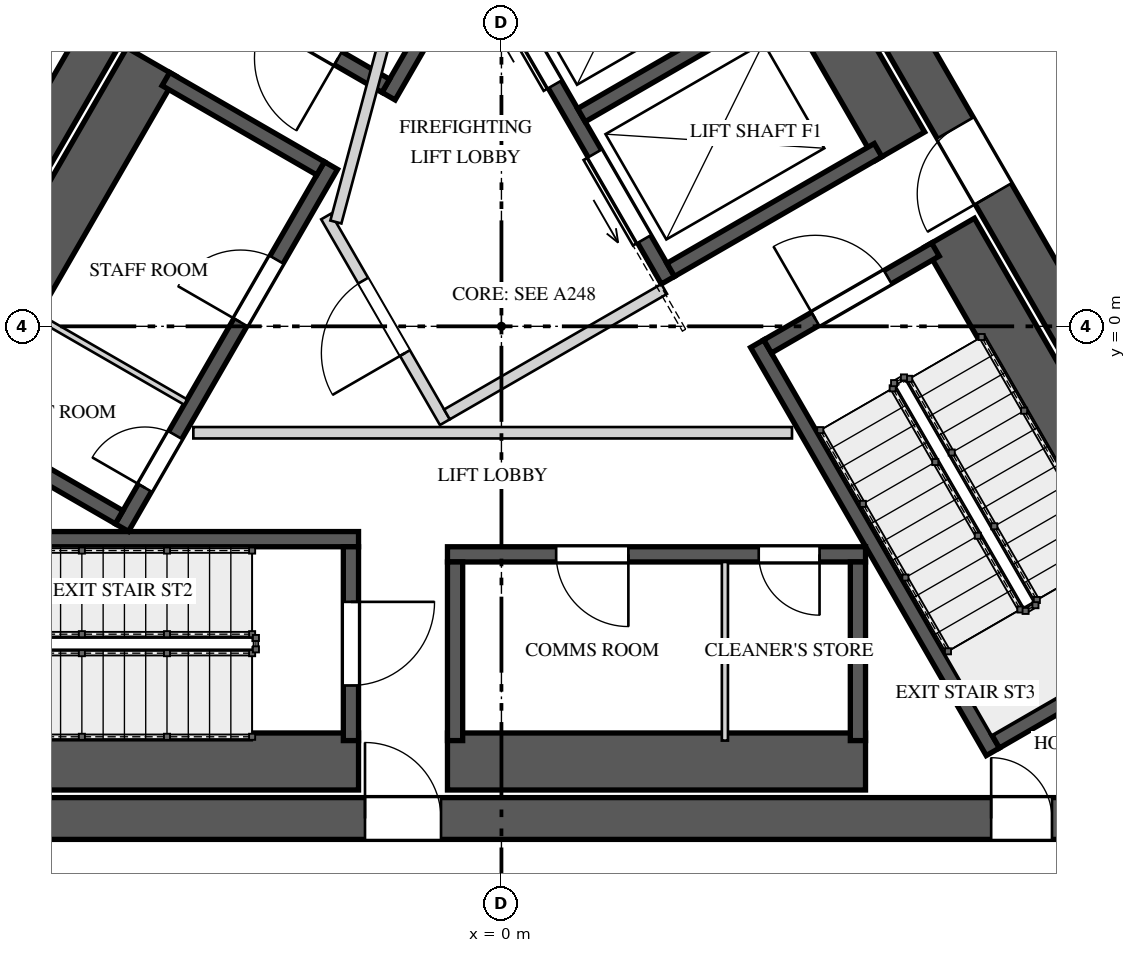
"""IFC4 building model, lengths in metres.
Left out: names, types, materials, properties, quantities, classifications, styles, units other than length and angle.
Written with IfcOpenShell. Run it as: python <this file> out.ifc"""

import sys

from ifc_helpers import new_model, si_unit, direction, frame, frame_2d, origin, place, context, subcontext, project, spatial, rectangle, extrude, element, fill, save


model = new_model("IFC4")
c1 = context("Model", 3, precision=1e-05, world=origin(), true_north=direction((0.0, 1.0)))
c2 = subcontext(c1, "Body", "Model", "MODEL_VIEW")
j1 = project(units=[si_unit("LENGTHUNIT", "METRE"), si_unit("PLANEANGLEUNIT", "RADIAN")], contexts=[c1])
p1 = place(None, origin())
s1 = spatial("IfcSite", under=j1, at=p1, CompositionType="ELEMENT")
p2 = place(p1, origin())
s2 = spatial("IfcBuilding", under=s1, at=p2, CompositionType="ELEMENT")
p3 = place(p2, frame((0.0, 0.0, 365.9)))
s3 = spatial("IfcBuildingStorey", under=s2, at=p3, CompositionType="ELEMENT", Elevation=365.9)
p4 = place(p3, frame((-1.285, 10.725, 0.0), z_axis=(0.0, 0.0, 1.0), x_axis=(-0.499994590896, -0.86602852671, 0.0)))
e1 = element("IfcWall", 1, at=p4, inside=s3, PredefinedType="SHEAR", context=c2, shape_type="SweptSolid", body=[
    extrude(rectangle(XDim=17.292, YDim=0.55, at=frame_2d((8.646, 0.0))), origin(), (0.0, 0.0, 1.0), 4.5),
])
p5 = place(p4, frame((6.851, 0.0, 0.0)))
e2 = element("IfcOpeningElement", 2, at=p5, cuts=e1, PredefinedType="OPENING", context=c2, shape_type="SweptSolid", body=[
    extrude(rectangle(XDim=1.0, YDim=2.4, at=frame_2d((0.5, 1.2))), frame((0.0, 0.285, 0.0), z_axis=(0.0, -1.0, 0.0), x_axis=(1.0, 0.0, 0.0)), (0.0, 0.0, 1.0), 0.57),
])
p6 = place(p3, frame((-8.646, -6.475, 0.0), z_axis=(0.0, 0.0, 1.0), x_axis=(1.0, 0.0, 0.0)))
e3 = element("IfcWall", 3, at=p6, inside=s3, PredefinedType="SHEAR", context=c2, shape_type="SweptSolid", body=[
    extrude(rectangle(XDim=17.292, YDim=0.55, at=frame_2d((8.646, 0.0))), origin(), (0.0, 0.0, 1.0), 4.5),
])
p7 = place(p6, frame((6.851, 0.0, 0.0)))
e4 = element("IfcOpeningElement", 4, at=p7, cuts=e3, PredefinedType="OPENING", context=c2, shape_type="SweptSolid", body=[
    extrude(rectangle(XDim=1.0, YDim=2.4, at=frame_2d((0.5, 1.2))), frame((0.0, 0.285, 0.0), z_axis=(0.0, -1.0, 0.0), x_axis=(1.0, 0.0, 0.0)), (0.0, 0.0, 1.0), 0.57),
])
p8 = place(p6, frame((15.089, 0.0, 0.0)))
e5 = element("IfcOpeningElement", 5, at=p8, cuts=e3, PredefinedType="OPENING", context=c2, shape_type="SweptSolid", body=[
    extrude(rectangle(XDim=0.8, YDim=2.1, at=frame_2d((0.4, 1.05))), frame((0.0, 0.285, 0.0), z_axis=(0.0, -1.0, 0.0), x_axis=(1.0, 0.0, 0.0)), (0.0, 0.0, 1.0), 0.57),
])
p9 = place(p3, frame((9.93, -4.25, 0.0), z_axis=(0.0, 0.0, 1.0), x_axis=(-0.499994590896, 0.86602852671, 0.0)))
e6 = element("IfcWall", 6, at=p9, inside=s3, PredefinedType="SHEAR", context=c2, shape_type="SweptSolid", body=[
    extrude(rectangle(XDim=17.292, YDim=0.55, at=frame_2d((8.646, 0.0))), origin(), (0.0, 0.0, 1.0), 4.5),
])
p10 = place(p9, frame((6.921, 0.0, 0.0)))
e7 = element("IfcOpeningElement", 7, at=p10, cuts=e6, PredefinedType="OPENING", context=c2, shape_type="SweptSolid", body=[
    extrude(rectangle(XDim=1.0, YDim=2.4, at=frame_2d((0.5, 1.2))), frame((0.0, 0.285, 0.0), z_axis=(0.0, -1.0, 0.0), x_axis=(1.0, 0.0, 0.0)), (0.0, 0.0, 1.0), 0.57),
])
p11 = place(p9, frame((14.626, 0.0, 0.0)))
e8 = element("IfcOpeningElement", 8, at=p11, cuts=e6, PredefinedType="OPENING", context=c2, shape_type="SweptSolid", body=[
    extrude(rectangle(XDim=0.8, YDim=2.1, at=frame_2d((0.4, 1.05))), frame((0.0, 0.285, 0.0), z_axis=(0.0, -1.0, 0.0), x_axis=(1.0, 0.0, 0.0)), (0.0, 0.0, 1.0), 0.57),
])
p12 = place(p3, frame((1.615, 8.397, 0.0), z_axis=(0.0, 0.0, 1.0), x_axis=(-0.500009909098, -0.866019682689, 0.0)))
e9 = element("IfcWall", 9, at=p12, inside=s3, PredefinedType="SOLIDWALL", context=c2, shape_type="SweptSolid", body=[
    extrude(rectangle(XDim=6.2, YDim=0.2, at=frame_2d((3.1, 0.0))), origin(), (0.0, 0.0, 1.0), 4.15),
])
p13 = place(p3, frame((-1.521, 3.165, 0.0), z_axis=(0.0, 0.0, 1.0), x_axis=(-0.866030925526, 0.499990435942, 0.0)))
e10 = element("IfcWall", 10, at=p13, inside=s3, PredefinedType="SOLIDWALL", context=c2, shape_type="SweptSolid", body=[
    extrude(rectangle(XDim=2.55, YDim=0.2, at=frame_2d((1.275, 0.0))), origin(), (0.0, 0.0, 1.0), 4.15),
])
p14 = place(p13, frame((0.725, 0.0, 0.0)))
e11 = element("IfcOpeningElement", 11, at=p14, cuts=e10, PredefinedType="OPENING", context=c2, shape_type="SweptSolid", body=[
    extrude(rectangle(XDim=1.1, YDim=2.4, at=frame_2d((0.55, 1.2))), frame((0.0, 0.11, 0.0), z_axis=(0.0, -1.0, 0.0), x_axis=(1.0, 0.0, 0.0)), (0.0, 0.0, 1.0), 0.22),
])
p15 = place(p3, frame((-8.08, -5.725, 0.0), z_axis=(0.0, 0.0, 1.0), x_axis=(1.0, 0.0, 0.0)))
e12 = element("IfcWall", 12, at=p15, inside=s3, PredefinedType="SOLIDWALL", context=c2, shape_type="SweptSolid", body=[
    extrude(rectangle(XDim=6.2, YDim=0.75, at=frame_2d((3.1, 0.0))), origin(), (0.0, 0.0, 1.0), 4.15),
])
p16 = place(p3, frame((-8.08, -2.8, 0.0), z_axis=(0.0, 0.0, 1.0), x_axis=(1.0, 0.0, 0.0)))
e13 = element("IfcWall", 13, at=p16, inside=s3, PredefinedType="SOLIDWALL", context=c2, shape_type="SweptSolid", body=[
    extrude(rectangle(XDim=6.2, YDim=0.2, at=frame_2d((3.1, 0.0))), origin(), (0.0, 0.0, 1.0), 4.15),
])
p17 = place(p3, frame((-1.98, -2.9, 0.0), z_axis=(0.0, 0.0, 1.0), x_axis=(0.0, -1.0, 0.0)))
e14 = element("IfcWall", 14, at=p17, inside=s3, PredefinedType="SOLIDWALL", context=c2, shape_type="SweptSolid", body=[
    extrude(rectangle(XDim=2.55, YDim=0.2, at=frame_2d((1.275, 0.0))), origin(), (0.0, 0.0, 1.0), 4.15),
])
p18 = place(p17, frame((0.725, 0.0, 0.0)))
e15 = element("IfcOpeningElement", 15, at=p18, cuts=e14, PredefinedType="OPENING", context=c2, shape_type="SweptSolid", body=[
    extrude(rectangle(XDim=1.1, YDim=2.4, at=frame_2d((0.55, 1.2))), frame((0.0, 0.11, 0.0), z_axis=(0.0, -1.0, 0.0), x_axis=(1.0, 0.0, 0.0)), (0.0, 0.0, 1.0), 0.22),
])
p19 = place(p3, frame((8.998, -4.135, 0.0), z_axis=(0.0, 0.0, 1.0), x_axis=(-0.500009909098, 0.866019682689, 0.0)))
e16 = element("IfcWall", 16, at=p19, inside=s3, PredefinedType="SOLIDWALL", context=c2, shape_type="SweptSolid", body=[
    extrude(rectangle(XDim=6.2, YDim=0.75, at=frame_2d((3.1, 0.0))), origin(), (0.0, 0.0, 1.0), 4.15),
])
p20 = place(p3, frame((6.465, -5.597, 0.0), z_axis=(0.0, 0.0, 1.0), x_axis=(-0.49998037582, 0.866036733513, 0.0)))
e17 = element("IfcWall", 17, at=p20, inside=s3, PredefinedType="SOLIDWALL", context=c2, shape_type="SweptSolid", body=[
    extrude(rectangle(XDim=6.2, YDim=0.2, at=frame_2d((3.1, 0.0))), origin(), (0.0, 0.0, 1.0), 4.15),
])
p21 = place(p3, frame((6.501, -5.461, 0.0), z_axis=(0.0, 0.0, 1.0), x_axis=(0.865989465428, 0.500062241894, 0.0)))
e18 = element("IfcWall", 18, at=p21, inside=s3, PredefinedType="SOLIDWALL", context=c2, shape_type="SweptSolid", body=[
    extrude(rectangle(XDim=2.55, YDim=0.2, at=frame_2d((1.275, 0.0))), origin(), (0.0, 0.0, 1.0), 4.15),
])
p22 = place(p3, frame((3.501, -0.265, 0.0), z_axis=(0.0, 0.0, 1.0), x_axis=(0.866030925526, 0.499990435942, 0.0)))
e19 = element("IfcWall", 19, at=p22, inside=s3, PredefinedType="SOLIDWALL", context=c2, shape_type="SweptSolid", body=[
    extrude(rectangle(XDim=2.55, YDim=0.2, at=frame_2d((1.275, 0.0))), origin(), (0.0, 0.0, 1.0), 4.15),
])
p23 = place(p22, frame((0.725, 0.0, 0.0)))
e20 = element("IfcOpeningElement", 20, at=p23, cuts=e19, PredefinedType="OPENING", context=c2, shape_type="SweptSolid", body=[
    extrude(rectangle(XDim=1.1, YDim=2.4, at=frame_2d((0.55, 1.2))), frame((0.0, 0.11, 0.0), z_axis=(0.0, -1.0, 0.0), x_axis=(1.0, 0.0, 0.0)), (0.0, 0.0, 1.0), 0.22),
])
p24 = place(p3, frame((-4.993, -2.648, 0.0), z_axis=(0.0, 0.0, 1.0), x_axis=(0.499996545922, 0.866027397988, 0.0)))
e21 = element("IfcWall", 21, at=p24, inside=s3, PredefinedType="SOLIDWALL", context=c2, shape_type="SweptSolid", body=[
    extrude(rectangle(XDim=5.5, YDim=0.2, at=frame_2d((2.75, 0.0))), origin(), (0.0, 0.0, 1.0), 4.15),
])
p25 = place(p24, frame((3.12, 0.0, 0.0)))
e22 = element("IfcOpeningElement", 22, at=p25, cuts=e21, PredefinedType="OPENING", context=c2, shape_type="SweptSolid", body=[
    extrude(rectangle(XDim=0.95, YDim=2.4, at=frame_2d((0.475, 1.2))), frame((0.0, 0.11, 0.0), z_axis=(0.0, -1.0, 0.0), x_axis=(1.0, 0.0, 0.0)), (0.0, 0.0, 1.0), 0.22),
])
p26 = place(p24, frame((0.605, 0.0, 0.0)))
e23 = element("IfcOpeningElement", 23, at=p26, cuts=e21, PredefinedType="OPENING", context=c2, shape_type="SweptSolid", body=[
    extrude(rectangle(XDim=0.8, YDim=2.1, at=frame_2d((0.4, 1.05))), frame((0.0, 0.11, 0.0), z_axis=(0.0, -1.0, 0.0), x_axis=(1.0, 0.0, 0.0)), (0.0, 0.0, 1.0), 0.22),
])
p27 = place(p3, frame((-4.603, 3.477, 0.0), z_axis=(0.0, 0.0, 1.0), x_axis=(-0.500015767406, -0.866016300277, 0.0)))
e24 = element("IfcWall", 24, at=p27, inside=s3, PredefinedType="SOLIDWALL", context=c2, shape_type="SweptSolid", body=[
    extrude(rectangle(XDim=5.5, YDim=0.75, at=frame_2d((2.75, 0.0))), origin(), (0.0, 0.0, 1.0), 4.15),
])
p28 = place(p3, frame((-2.38, 2.078, 0.0), z_axis=(0.0, 0.0, 1.0), x_axis=(-0.866061024631, 0.499938297808, 0.0)))
e25 = element("IfcWall", 25, at=p28, inside=s3, PredefinedType="SOLIDWALL", context=c2, shape_type="SweptSolid", body=[
    extrude(rectangle(XDim=2.35, YDim=0.2, at=frame_2d((1.175, 0.0))), origin(), (0.0, 0.0, 1.0), 4.15),
])
p29 = place(p3, frame((-5.03, -2.512, 0.0), z_axis=(0.0, 0.0, 1.0), x_axis=(-0.866016039709, 0.500016218704, 0.0)))
e26 = element("IfcWall", 26, at=p29, inside=s3, PredefinedType="SOLIDWALL", context=c2, shape_type="SweptSolid", body=[
    extrude(rectangle(XDim=2.35, YDim=0.2, at=frame_2d((1.175, 0.0))), origin(), (0.0, 0.0, 1.0), 4.15),
])
p30 = place(p3, frame((-4.155, -0.996, 0.0), z_axis=(0.0, 0.0, 1.0), x_axis=(-0.866016039709, 0.500016218704, 0.0)))
e27 = element("IfcWall", 27, at=p30, inside=s3, PredefinedType="PARTITIONING", context=c2, shape_type="SweptSolid", body=[
    extrude(rectangle(XDim=2.35, YDim=0.08, at=frame_2d((1.175, 0.0))), origin(), (0.0, 0.0, 1.0), 4.15),
])
p31 = place(p3, frame((4.79, -3.0, 0.0), z_axis=(0.0, 0.0, 1.0), x_axis=(-1.0, 0.0, 0.0)))
e28 = element("IfcWall", 28, at=p31, inside=s3, PredefinedType="SOLIDWALL", context=c2, shape_type="SweptSolid", body=[
    extrude(rectangle(XDim=5.5, YDim=0.2, at=frame_2d((2.75, 0.0))), origin(), (0.0, 0.0, 1.0), 4.15),
])
p32 = place(p31, frame((3.12, 0.0, 0.0)))
e29 = element("IfcOpeningElement", 29, at=p32, cuts=e28, PredefinedType="OPENING", context=c2, shape_type="SweptSolid", body=[
    extrude(rectangle(XDim=0.95, YDim=2.4, at=frame_2d((0.475, 1.2))), frame((0.0, 0.11, 0.0), z_axis=(0.0, -1.0, 0.0), x_axis=(1.0, 0.0, 0.0)), (0.0, 0.0, 1.0), 0.22),
])
p33 = place(p31, frame((0.605, 0.0, 0.0)))
e30 = element("IfcOpeningElement", 30, at=p33, cuts=e28, PredefinedType="OPENING", context=c2, shape_type="SweptSolid", body=[
    extrude(rectangle(XDim=0.8, YDim=2.1, at=frame_2d((0.4, 1.05))), frame((0.0, 0.11, 0.0), z_axis=(0.0, -1.0, 0.0), x_axis=(1.0, 0.0, 0.0)), (0.0, 0.0, 1.0), 0.22),
])
p34 = place(p3, frame((-0.71, -5.725, 0.0), z_axis=(0.0, 0.0, 1.0), x_axis=(1.0, 0.0, 0.0)))
e31 = element("IfcWall", 31, at=p34, inside=s3, PredefinedType="SOLIDWALL", context=c2, shape_type="SweptSolid", body=[
    extrude(rectangle(XDim=5.5, YDim=0.75, at=frame_2d((2.75, 0.0))), origin(), (0.0, 0.0, 1.0), 4.15),
])
for number, where, z_axis, x_axis in (
    (32, (-0.61, -3.1, 0.0), (0.0, 0.0, 1.0), (0.0, -1.0, 0.0)),
    (33, (4.69, -3.1, 0.0), (0.0, 0.0, 1.0), (0.0, -1.0, 0.0)),
):
    element("IfcWall", number, at=place(p3, frame(where, z_axis=z_axis, x_axis=x_axis)), inside=s3, PredefinedType="SOLIDWALL", context=c2, shape_type="SweptSolid", body=[
        extrude(rectangle(XDim=2.35, YDim=0.2, at=frame_2d((1.175, 0.0))), origin(), (0.0, 0.0, 1.0), 4.15),
    ])
p35 = place(p3, frame((2.94, -3.1, 0.0), z_axis=(0.0, 0.0, 1.0), x_axis=(0.0, -1.0, 0.0)))
e34 = element("IfcWall", 34, at=p35, inside=s3, PredefinedType="PARTITIONING", context=c2, shape_type="SweptSolid", body=[
    extrude(rectangle(XDim=2.35, YDim=0.08, at=frame_2d((1.175, 0.0))), origin(), (0.0, 0.0, 1.0), 4.15),
])
p36 = place(p3, frame((2.19, 0.606, 0.0), z_axis=(0.0, 0.0, 1.0), x_axis=(-0.500002801628, 0.866023786258, 0.0)))
e35 = element("IfcWall", 35, at=p36, inside=s3, PredefinedType="SOLIDWALL", context=c2, shape_type="SweptSolid", body=[
    extrude(rectangle(XDim=4.9, YDim=0.2, at=frame_2d((2.45, 0.0))), origin(), (0.0, 0.0, 1.0), 4.15),
])
p37 = place(p36, frame((0.625, 0.0, 0.0)))
e36 = element("IfcOpeningElement", 36, at=p37, cuts=e35, PredefinedType="OPENING", context=c2, shape_type="SweptSolid", body=[
    extrude(rectangle(XDim=1.3, YDim=2.1, at=frame_2d((0.65, 1.05))), frame((0.0, 0.11, 0.0), z_axis=(0.0, -1.0, 0.0), x_axis=(1.0, 0.0, 0.0)), (0.0, 0.0, 1.0), 0.22),
])
p38 = place(p36, frame((2.975, 0.0, 0.0)))
e37 = element("IfcOpeningElement", 37, at=p38, cuts=e35, PredefinedType="OPENING", context=c2, shape_type="SweptSolid", body=[
    extrude(rectangle(XDim=1.3, YDim=2.1, at=frame_2d((0.65, 1.05))), frame((0.0, 0.11, 0.0), z_axis=(0.0, -1.0, 0.0), x_axis=(1.0, 0.0, 0.0)), (0.0, 0.0, 1.0), 0.22),
])
p39 = place(p3, frame((5.243, 2.369, 0.0), z_axis=(0.0, 0.0, 1.0), x_axis=(-0.500002801628, 0.866023786258, 0.0)))
e38 = element("IfcWall", 38, at=p39, inside=s3, PredefinedType="SOLIDWALL", context=c2, shape_type="SweptSolid", body=[
    extrude(rectangle(XDim=4.9, YDim=0.75, at=frame_2d((2.45, 0.0))), origin(), (0.0, 0.0, 1.0), 4.15),
])
for number, where, z_axis, x_axis in (
    (39, (2.227, 0.743, 0.0), (0.0, 0.0, 1.0), (0.866, 0.5, 0.0)),
    (40, (1.052, 2.778, 0.0), (0.0, 0.0, 1.0), (0.866, 0.5, 0.0)),
):
    element("IfcWall", number, at=place(p3, frame(where, z_axis=z_axis, x_axis=x_axis)), inside=s3, PredefinedType="SOLIDWALL", context=c2, shape_type="SweptSolid", body=[
        extrude(rectangle(XDim=3.15, YDim=0.2, at=frame_2d((1.575, 0.0))), origin(), (0.0, 0.0, 1.0), 4.15),
    ])
p40 = place(p3, frame((-0.744, -1.261, 0.0), z_axis=(0.0, 0.0, 1.0), x_axis=(-0.500004234368, 0.866022959057, 0.0)))
e41 = element("IfcWall", 41, at=p40, inside=s3, PredefinedType="PARTITIONING", context=c2, shape_type="SweptSolid", body=[
    extrude(rectangle(XDim=3.125, YDim=0.15, at=frame_2d((1.562, 0.0))), origin(), (0.0, 0.0, 1.0), 4.15),
])
p41 = place(p40, frame((1.05, 0.0, 0.0)))
e42 = element("IfcOpeningElement", 42, at=p41, cuts=e41, PredefinedType="OPENING", context=c2, shape_type="SweptSolid", body=[
    extrude(rectangle(XDim=1.1, YDim=2.4, at=frame_2d((0.55, 1.2))), frame((0.0, 0.085, 0.0), z_axis=(0.0, -1.0, 0.0), x_axis=(1.0, 0.0, 0.0)), (0.0, 0.0, 1.0), 0.17),
])
p42 = place(p3, frame((-0.717, -1.159, 0.0), z_axis=(0.0, 0.0, 1.0), x_axis=(0.866008176907, 0.50002983664, 0.0)))
e43 = element("IfcWall", 43, at=p42, inside=s3, PredefinedType="PARTITIONING", context=c2, shape_type="SweptSolid", body=[
    extrude(rectangle(XDim=3.3, YDim=0.15, at=frame_2d((1.65, 0.0))), origin(), (0.0, 0.0, 1.0), 4.15),
])
p43 = place(p3, frame((-2.178, 1.372, 0.0), z_axis=(0.0, 0.0, 1.0), x_axis=(0.258808958833, 0.96592852884, 0.0)))
e44 = element("IfcWall", 44, at=p43, inside=s3, PredefinedType="PARTITIONING", context=c2, shape_type="SweptSolid", body=[
    extrude(rectangle(XDim=2.903, YDim=0.15, at=frame_2d((1.451, 0.0))), origin(), (0.0, 0.0, 1.0), 4.15),
])
p44 = place(p3, frame((-4.053, -1.4, 0.0), z_axis=(0.0, 0.0, 1.0), x_axis=(1.0, 0.0, 0.0)))
e45 = element("IfcWall", 45, at=p44, inside=s3, PredefinedType="PARTITIONING", context=c2, shape_type="SweptSolid", body=[
    extrude(rectangle(XDim=7.876, YDim=0.15, at=frame_2d((3.938, 0.0))), origin(), (0.0, 0.0, 1.0), 4.15),
])
p45 = place(p3, frame((7.253, 4.537, 0.0), z_axis=(0.0, 0.0, 1.0), x_axis=(0.500086965421, -0.865975188453, 0.0)))
e46 = element("IfcWall", 46, at=p45, inside=s3, PredefinedType="SOLIDWALL", context=c2, shape_type="SweptSolid", body=[
    extrude(rectangle(XDim=1.024, YDim=0.2, at=frame_2d((0.512, 0.0))), origin(), (0.0, 0.0, 1.0), 4.15),
])
p46 = place(p14, origin())
e47 = element("IfcDoor", 47, at=p46, inside=s3, OperationType="SINGLE_SWING_RIGHT", PredefinedType="DOOR", context=c2, shape_type="SweptSolid", body=[
    extrude(rectangle(XDim=1.1, YDim=2.4, at=frame_2d((0.55, 1.2))), frame((0.0, 0.025, 0.0), z_axis=(0.0, -1.0, 0.0), x_axis=(1.0, 0.0, 0.0)), (0.0, 0.0, 1.0), 0.05),
])
fill(e11, e47)
p47 = place(p18, origin())
e48 = element("IfcDoor", 48, at=p47, inside=s3, OperationType="SINGLE_SWING_LEFT", PredefinedType="DOOR", context=c2, shape_type="SweptSolid", body=[
    extrude(rectangle(XDim=1.1, YDim=2.4, at=frame_2d((0.55, 1.2))), frame((0.0, 0.025, 0.0), z_axis=(0.0, -1.0, 0.0), x_axis=(1.0, 0.0, 0.0)), (0.0, 0.0, 1.0), 0.05),
])
fill(e15, e48)
p48 = place(p23, origin())
e49 = element("IfcDoor", 49, at=p48, inside=s3, OperationType="SINGLE_SWING_RIGHT", PredefinedType="DOOR", context=c2, shape_type="SweptSolid", body=[
    extrude(rectangle(XDim=1.1, YDim=2.4, at=frame_2d((0.55, 1.2))), frame((0.0, 0.025, 0.0), z_axis=(0.0, -1.0, 0.0), x_axis=(1.0, 0.0, 0.0)), (0.0, 0.0, 1.0), 0.05),
])
fill(e20, e49)
p49 = place(p25, origin())
e50 = element("IfcDoor", 50, at=p49, inside=s3, OperationType="SINGLE_SWING_LEFT", PredefinedType="DOOR", context=c2, shape_type="SweptSolid", body=[
    extrude(rectangle(XDim=0.95, YDim=2.4, at=frame_2d((0.475, 1.2))), frame((0.0, 0.025, 0.0), z_axis=(0.0, -1.0, 0.0), x_axis=(1.0, 0.0, 0.0)), (0.0, 0.0, 1.0), 0.05),
])
fill(e22, e50)
p50 = place(p26, origin())
e51 = element("IfcDoor", 51, at=p50, inside=s3, OperationType="SINGLE_SWING_RIGHT", PredefinedType="DOOR", context=c2, shape_type="SweptSolid", body=[
    extrude(rectangle(XDim=0.8, YDim=2.1, at=frame_2d((0.4, 1.05))), frame((0.0, 0.025, 0.0), z_axis=(0.0, -1.0, 0.0), x_axis=(1.0, 0.0, 0.0)), (0.0, 0.0, 1.0), 0.05),
])
fill(e23, e51)
p51 = place(p32, origin())
e52 = element("IfcDoor", 52, at=p51, inside=s3, OperationType="SINGLE_SWING_LEFT", PredefinedType="DOOR", context=c2, shape_type="SweptSolid", body=[
    extrude(rectangle(XDim=0.95, YDim=2.4, at=frame_2d((0.475, 1.2))), frame((0.0, 0.025, 0.0), z_axis=(0.0, -1.0, 0.0), x_axis=(1.0, 0.0, 0.0)), (0.0, 0.0, 1.0), 0.05),
])
fill(e29, e52)
p52 = place(p33, origin())
e53 = element("IfcDoor", 53, at=p52, inside=s3, OperationType="SINGLE_SWING_RIGHT", PredefinedType="DOOR", context=c2, shape_type="SweptSolid", body=[
    extrude(rectangle(XDim=0.8, YDim=2.1, at=frame_2d((0.4, 1.05))), frame((0.0, 0.025, 0.0), z_axis=(0.0, -1.0, 0.0), x_axis=(1.0, 0.0, 0.0)), (0.0, 0.0, 1.0), 0.05),
])
fill(e30, e53)
p53 = place(p37, origin())
e54 = element("IfcDoor", 54, at=p53, inside=s3, OperationType="SLIDING_TO_LEFT", PredefinedType="DOOR", context=c2, shape_type="SweptSolid", body=[
    extrude(rectangle(XDim=1.3, YDim=2.1, at=frame_2d((0.65, 1.05))), frame((0.0, 0.025, 0.0), z_axis=(0.0, -1.0, 0.0), x_axis=(1.0, 0.0, 0.0)), (0.0, 0.0, 1.0), 0.05),
])
fill(e36, e54)
p54 = place(p38, origin())
e55 = element("IfcDoor", 55, at=p54, inside=s3, OperationType="SLIDING_TO_RIGHT", PredefinedType="DOOR", context=c2, shape_type="SweptSolid", body=[
    extrude(rectangle(XDim=1.3, YDim=2.1, at=frame_2d((0.65, 1.05))), frame((0.0, 0.025, 0.0), z_axis=(0.0, -1.0, 0.0), x_axis=(1.0, 0.0, 0.0)), (0.0, 0.0, 1.0), 0.05),
])
fill(e37, e55)
p55 = place(p41, origin())
e56 = element("IfcDoor", 56, at=p55, inside=s3, OperationType="SINGLE_SWING_LEFT", PredefinedType="DOOR", context=c2, shape_type="SweptSolid", body=[
    extrude(rectangle(XDim=1.1, YDim=2.4, at=frame_2d((0.55, 1.2))), frame((0.0, 0.025, 0.0), z_axis=(0.0, -1.0, 0.0), x_axis=(1.0, 0.0, 0.0)), (0.0, 0.0, 1.0), 0.05),
])
fill(e42, e56)
p56 = place(p7, origin())
e57 = element("IfcDoor", 57, at=p56, inside=s3, OperationType="SINGLE_SWING_LEFT", PredefinedType="DOOR", context=c2, shape_type="SweptSolid", body=[
    extrude(rectangle(XDim=1.0, YDim=2.4, at=frame_2d((0.5, 1.2))), frame((0.0, 0.025, 0.0), z_axis=(0.0, -1.0, 0.0), x_axis=(1.0, 0.0, 0.0)), (0.0, 0.0, 1.0), 0.05),
])
fill(e4, e57)
p57 = place(p10, origin())
e58 = element("IfcDoor", 58, at=p57, inside=s3, OperationType="SINGLE_SWING_RIGHT", PredefinedType="DOOR", context=c2, shape_type="SweptSolid", body=[
    extrude(rectangle(XDim=1.0, YDim=2.4, at=frame_2d((0.5, 1.2))), frame((0.0, 0.025, 0.0), z_axis=(0.0, -1.0, 0.0), x_axis=(1.0, 0.0, 0.0)), (0.0, 0.0, 1.0), 0.05),
])
fill(e7, e58)
p58 = place(p8, origin())
e59 = element("IfcDoor", 59, at=p58, inside=s3, OperationType="SINGLE_SWING_LEFT", PredefinedType="DOOR", context=c2, shape_type="SweptSolid", body=[
    extrude(rectangle(XDim=0.8, YDim=2.1, at=frame_2d((0.4, 1.05))), frame((0.0, 0.025, 0.0), z_axis=(0.0, -1.0, 0.0), x_axis=(1.0, 0.0, 0.0)), (0.0, 0.0, 1.0), 0.05),
])
fill(e5, e59)
save(model, sys.argv[1])
